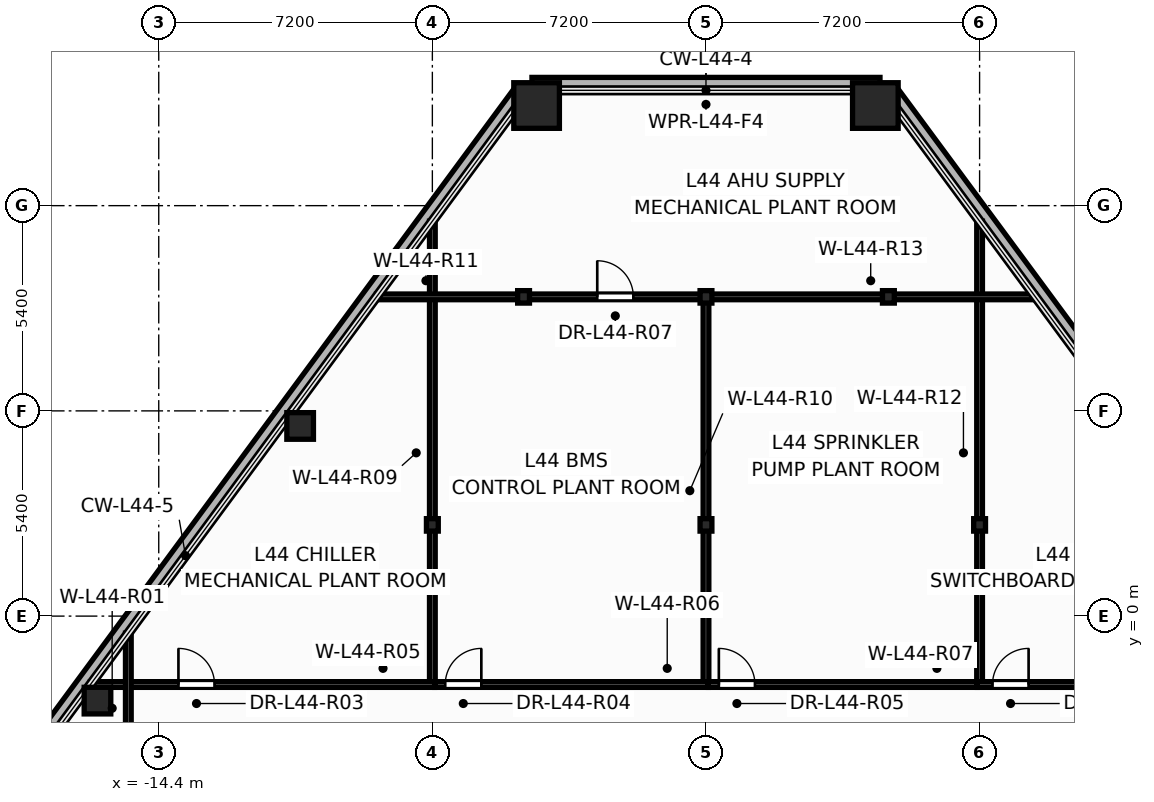
"""IFC4 building model, lengths in metres.
Left out: names, types, materials, properties, quantities, classifications, styles, units other than length and angle.
Written with IfcOpenShell. Run it as: python <this file> out.ifc"""

import sys

from ifc_helpers import new_model, si_unit, direction, frame, frame_2d, origin, origin_2d, place, context, subcontext, project, spatial, rectangle, hollow_rectangle, hollow_circle, i_section, extrude, element, fill, save


model = new_model("IFC4")
c1 = context("Model", 3, precision=1e-05, world=origin(), true_north=direction((0.0, 1.0)))
c2 = subcontext(c1, "Body", "Model", "MODEL_VIEW")
j1 = project(units=[si_unit("LENGTHUNIT", "METRE"), si_unit("PLANEANGLEUNIT", "RADIAN")], contexts=[c1])
p1 = place(None, origin())
s1 = spatial("IfcSite", under=j1, at=p1, CompositionType="ELEMENT")
p2 = place(p1, origin())
s2 = spatial("IfcBuilding", under=s1, at=p2, CompositionType="ELEMENT")
p3 = place(p2, frame((0.0, 0.0, 168.9)))
s3 = spatial("IfcBuildingStorey", under=s2, at=p3, CompositionType="ELEMENT", Elevation=168.9)
for number, where, z_axis, x_axis in (
    (1, (4.457, 13.435, 0.0), (0.0, 0.0, 1.0), (1.0, 0.0, 0.0)),
    (2, (-4.457, 13.435, 0.0), (0.0, 0.0, 1.0), (1.0, 0.0, 0.0)),
):
    element("IfcColumn", number, at=place(p3, frame(where, z_axis=z_axis, x_axis=x_axis)), inside=s3, PredefinedType="COLUMN", context=c2, shape_type="SweptSolid", body=[
        extrude(hollow_rectangle(XDim=1.2, YDim=1.2, WallThickness=0.055, at=origin_2d()), origin(), (0.0, 0.0, 1.0), 4.8),
    ])
for number, where, z_axis, x_axis in (
    (3, (-10.679, 5.003, 0.0), (0.0, 0.0, 1.0), (1.0, 0.0, 0.0)),
    (4, (-16.012, -2.223, 0.0), (0.0, 0.0, 1.0), (1.0, 0.0, 0.0)),
):
    element("IfcColumn", number, at=place(p3, frame(where, z_axis=z_axis, x_axis=x_axis)), inside=s3, PredefinedType="COLUMN", context=c2, shape_type="SweptSolid", body=[
        extrude(hollow_circle(Radius=0.35, WallThickness=0.03, at=origin_2d()), origin(), (0.0, 0.0, 1.0), 4.8),
    ])
for number, where, z_axis, x_axis in (
    (5, (-7.2, 2.4, 0.0), (0.0, 0.0, 1.0), (1.0, 0.0, 0.0)),
    (6, (0.0, 2.4, 0.0), (0.0, 0.0, 1.0), (1.0, 0.0, 0.0)),
    (7, (7.2, 2.4, 0.0), (0.0, 0.0, 1.0), (1.0, 0.0, 0.0)),
    (8, (-4.8, 8.4, 0.0), (0.0, 0.0, 1.0), (1.0, 0.0, 0.0)),
    (9, (0.0, 8.4, 0.0), (0.0, 0.0, 1.0), (1.0, 0.0, 0.0)),
    (10, (4.8, 8.4, 0.0), (0.0, 0.0, 1.0), (1.0, 0.0, 0.0)),
):
    element("IfcColumn", number, at=place(p3, frame(where, z_axis=z_axis, x_axis=x_axis)), inside=s3, PredefinedType="COLUMN", context=c2, shape_type="SweptSolid", body=[
        extrude(i_section(OverallWidth=0.311, OverallDepth=0.327, WebThickness=0.016, FlangeThickness=0.025, at=origin_2d()), origin(), (0.0, 0.0, 1.0), 4.8),
    ])
p4 = place(p3, frame((22.812, -10.495, -0.2), z_axis=(0.0, 0.0, 1.0), x_axis=(-0.593788907914, 0.804620862791, 0.0)))
e11 = element("IfcWall", 11, at=p4, inside=s3, PredefinedType="PARAPET", context=c2, shape_type="SweptSolid", body=[
    extrude(rectangle(XDim=30.276, YDim=0.36, at=frame_2d((15.138, 0.0))), origin(), (0.0, 0.0, 1.0), 0.38),
])
p5 = place(p3, frame((4.579, 13.995, -0.2), z_axis=(0.0, 0.0, 1.0), x_axis=(-1.0, 0.0, 0.0)))
e12 = element("IfcWall", 12, at=p5, inside=s3, PredefinedType="PARAPET", context=c2, shape_type="SweptSolid", body=[
    extrude(rectangle(XDim=9.158, YDim=0.36, at=frame_2d((4.579, 0.0))), origin(), (0.0, 0.0, 1.0), 0.38),
])
p6 = place(p3, frame((-4.835, 13.865, -0.2), z_axis=(0.0, 0.0, 1.0), x_axis=(-0.593788907914, -0.804620862791, 0.0)))
e13 = element("IfcWall", 13, at=p6, inside=s3, PredefinedType="PARAPET", context=c2, shape_type="SweptSolid", body=[
    extrude(rectangle(XDim=30.276, YDim=0.36, at=frame_2d((15.138, 0.0))), origin(), (0.0, 0.0, 1.0), 0.38),
])
for number, where, z_axis, x_axis in (
    (14, (-7.2, -1.8, 0.0), (0.0, 0.0, 1.0), (0.0, 1.0, 0.0)),
    (15, (7.2, -1.8, 0.0), (0.0, 0.0, 1.0), (0.0, 1.0, 0.0)),
):
    element("IfcWall", number, at=place(p3, frame(where, z_axis=z_axis, x_axis=x_axis)), inside=s3, PredefinedType="PARTITIONING", context=c2, shape_type="SweptSolid", body=[
        extrude(rectangle(XDim=12.191, YDim=0.15, at=frame_2d((6.096, 0.0))), origin(), (0.0, 0.0, 1.0), 2.485),
    ])
p7 = place(p3, frame((0.0, -1.8, 0.0), z_axis=(0.0, 0.0, 1.0), x_axis=(0.0, 1.0, 0.0)))
e16 = element("IfcWall", 16, at=p7, inside=s3, PredefinedType="PARTITIONING", context=c2, shape_type="SweptSolid", body=[
    extrude(rectangle(XDim=10.2, YDim=0.15, at=frame_2d((5.1, 0.0))), origin(), (0.0, 0.0, 1.0), 3.495),
])
p8 = place(p3, frame((-16.197, -1.8, 0.0), z_axis=(0.0, 0.0, 1.0), x_axis=(1.0, 0.0, 0.0)))
e17 = element("IfcWall", 17, at=p8, inside=s3, PredefinedType="PARTITIONING", context=c2, shape_type="SweptSolid", body=[
    extrude(rectangle(XDim=9.057, YDim=0.15, at=frame_2d((4.529, 0.0))), origin(), (0.0, 0.0, 1.0), 2.485),
])
p9 = place(p8, frame((2.315, 0.0, 0.0)))
e18 = element("IfcOpeningElement", 18, at=p9, cuts=e17, PredefinedType="OPENING", context=c2, shape_type="SweptSolid", body=[
    extrude(rectangle(XDim=0.956, YDim=2.104, at=frame_2d((0.475, 1.052))), frame((0.0, 0.085, 0.0), z_axis=(0.0, -1.0, 0.0), x_axis=(1.0, 0.0, 0.0)), (0.0, 0.0, 1.0), 0.17),
])
p10 = place(p3, frame((7.14, -1.8, 0.0), z_axis=(0.0, 0.0, 1.0), x_axis=(1.0, 0.0, 0.0)))
e19 = element("IfcWall", 19, at=p10, inside=s3, PredefinedType="PARTITIONING", context=c2, shape_type="SweptSolid", body=[
    extrude(rectangle(XDim=9.057, YDim=0.15, at=frame_2d((4.529, 0.0))), origin(), (0.0, 0.0, 1.0), 2.485),
])
p11 = place(p10, frame((0.4, 0.0, 0.0)))
e20 = element("IfcOpeningElement", 20, at=p11, cuts=e19, PredefinedType="OPENING", context=c2, shape_type="SweptSolid", body=[
    extrude(rectangle(XDim=0.956, YDim=2.104, at=frame_2d((0.475, 1.052))), frame((0.0, 0.085, 0.0), z_axis=(0.0, -1.0, 0.0), x_axis=(1.0, 0.0, 0.0)), (0.0, 0.0, 1.0), 0.17),
])
p12 = place(p3, frame((-8.67, 8.4, 0.0), z_axis=(0.0, 0.0, 1.0), x_axis=(1.0, 0.0, 0.0)))
e21 = element("IfcWall", 21, at=p12, inside=s3, PredefinedType="PARTITIONING", context=c2, shape_type="SweptSolid", body=[
    extrude(rectangle(XDim=8.67, YDim=0.15, at=frame_2d((4.335, 0.0))), origin(), (0.0, 0.0, 1.0), 2.585),
])
p13 = place(p12, frame((5.809, 0.0, 0.0)))
e22 = element("IfcOpeningElement", 22, at=p13, cuts=e21, PredefinedType="OPENING", context=c2, shape_type="SweptSolid", body=[
    extrude(rectangle(XDim=0.956, YDim=2.104, at=frame_2d((0.475, 1.052))), frame((0.0, 0.085, 0.0), z_axis=(0.0, -1.0, 0.0), x_axis=(1.0, 0.0, 0.0)), (0.0, 0.0, 1.0), 0.17),
])
p14 = place(p3, frame((0.0, 8.4, 0.0), z_axis=(0.0, 0.0, 1.0), x_axis=(1.0, 0.0, 0.0)))
e23 = element("IfcWall", 23, at=p14, inside=s3, PredefinedType="PARTITIONING", context=c2, shape_type="SweptSolid", body=[
    extrude(rectangle(XDim=8.67, YDim=0.15, at=frame_2d((4.335, 0.0))), origin(), (0.0, 0.0, 1.0), 2.585),
])
p15 = place(p3, frame((-7.138, -1.8, 0.0), z_axis=(0.0, 0.0, 1.0), x_axis=(1.0, 0.0, 0.0)))
e24 = element("IfcWall", 24, at=p15, inside=s3, PredefinedType="PARTITIONING", context=c2, shape_type="SweptSolid", body=[
    extrude(rectangle(XDim=7.198, YDim=0.15, at=frame_2d((3.599, 0.0))), origin(), (0.0, 0.0, 1.0), 2.485),
])
p16 = place(p15, frame((0.277, 0.0, 0.0)))
e25 = element("IfcOpeningElement", 25, at=p16, cuts=e24, PredefinedType="OPENING", context=c2, shape_type="SweptSolid", body=[
    extrude(rectangle(XDim=0.956, YDim=2.104, at=frame_2d((0.475, 1.052))), frame((0.0, 0.085, 0.0), z_axis=(0.0, -1.0, 0.0), x_axis=(1.0, 0.0, 0.0)), (0.0, 0.0, 1.0), 0.17),
])
p17 = place(p3, frame((0.062, -1.8, 0.0), z_axis=(0.0, 0.0, 1.0), x_axis=(1.0, 0.0, 0.0)))
e26 = element("IfcWall", 26, at=p17, inside=s3, PredefinedType="PARTITIONING", context=c2, shape_type="SweptSolid", body=[
    extrude(rectangle(XDim=7.076, YDim=0.15, at=frame_2d((3.538, 0.0))), origin(), (0.0, 0.0, 1.0), 2.485),
])
p18 = place(p17, frame((0.277, 0.0, 0.0)))
e27 = element("IfcOpeningElement", 27, at=p18, cuts=e26, PredefinedType="OPENING", context=c2, shape_type="SweptSolid", body=[
    extrude(rectangle(XDim=0.956, YDim=2.104, at=frame_2d((0.475, 1.052))), frame((0.0, 0.085, 0.0), z_axis=(0.0, -1.0, 0.0), x_axis=(1.0, 0.0, 0.0)), (0.0, 0.0, 1.0), 0.17),
])
p19 = place(p3, frame((-15.2, -4.4, 0.0), z_axis=(0.0, 0.0, 1.0), x_axis=(0.0, 1.0, 0.0)))
e28 = element("IfcWall", 28, at=p19, inside=s3, PredefinedType="PARTITIONING", context=c2, shape_type="SweptSolid", body=[
    extrude(rectangle(XDim=3.951, YDim=0.15, at=frame_2d((1.975, 0.0))), origin(), (0.0, 0.0, 1.0), 2.485),
])
p20 = place(p9, origin())
e29 = element("IfcDoor", 29, at=p20, inside=s3, OperationType="SINGLE_SWING_LEFT", PredefinedType="DOOR", context=c2, shape_type="SweptSolid", body=[
    extrude(rectangle(XDim=0.95, YDim=2.1, at=frame_2d((0.475, 1.05))), frame((0.0, 0.025, 0.0), z_axis=(0.0, -1.0, 0.0), x_axis=(1.0, 0.0, 0.0)), (0.0, 0.0, 1.0), 0.05),
])
fill(e18, e29)
p21 = place(p16, origin())
e30 = element("IfcDoor", 30, at=p21, inside=s3, OperationType="SINGLE_SWING_RIGHT", PredefinedType="DOOR", context=c2, shape_type="SweptSolid", body=[
    extrude(rectangle(XDim=0.95, YDim=2.1, at=frame_2d((0.475, 1.05))), frame((0.0, 0.025, 0.0), z_axis=(0.0, -1.0, 0.0), x_axis=(1.0, 0.0, 0.0)), (0.0, 0.0, 1.0), 0.05),
])
fill(e25, e30)
p22 = place(p18, origin())
e31 = element("IfcDoor", 31, at=p22, inside=s3, OperationType="SINGLE_SWING_LEFT", PredefinedType="DOOR", context=c2, shape_type="SweptSolid", body=[
    extrude(rectangle(XDim=0.95, YDim=2.1, at=frame_2d((0.475, 1.05))), frame((0.0, 0.025, 0.0), z_axis=(0.0, -1.0, 0.0), x_axis=(1.0, 0.0, 0.0)), (0.0, 0.0, 1.0), 0.05),
])
fill(e27, e31)
p23 = place(p11, origin())
e32 = element("IfcDoor", 32, at=p23, inside=s3, OperationType="SINGLE_SWING_RIGHT", PredefinedType="DOOR", context=c2, shape_type="SweptSolid", body=[
    extrude(rectangle(XDim=0.95, YDim=2.1, at=frame_2d((0.475, 1.05))), frame((0.0, 0.025, 0.0), z_axis=(0.0, -1.0, 0.0), x_axis=(1.0, 0.0, 0.0)), (0.0, 0.0, 1.0), 0.05),
])
fill(e20, e32)
p24 = place(p13, origin())
e33 = element("IfcDoor", 33, at=p24, inside=s3, OperationType="SINGLE_SWING_LEFT", PredefinedType="DOOR", context=c2, shape_type="SweptSolid", body=[
    extrude(rectangle(XDim=0.95, YDim=2.1, at=frame_2d((0.475, 1.05))), frame((0.0, 0.025, 0.0), z_axis=(0.0, -1.0, 0.0), x_axis=(1.0, 0.0, 0.0)), (0.0, 0.0, 1.0), 0.05),
])
fill(e22, e33)
save(model, sys.argv[1])
